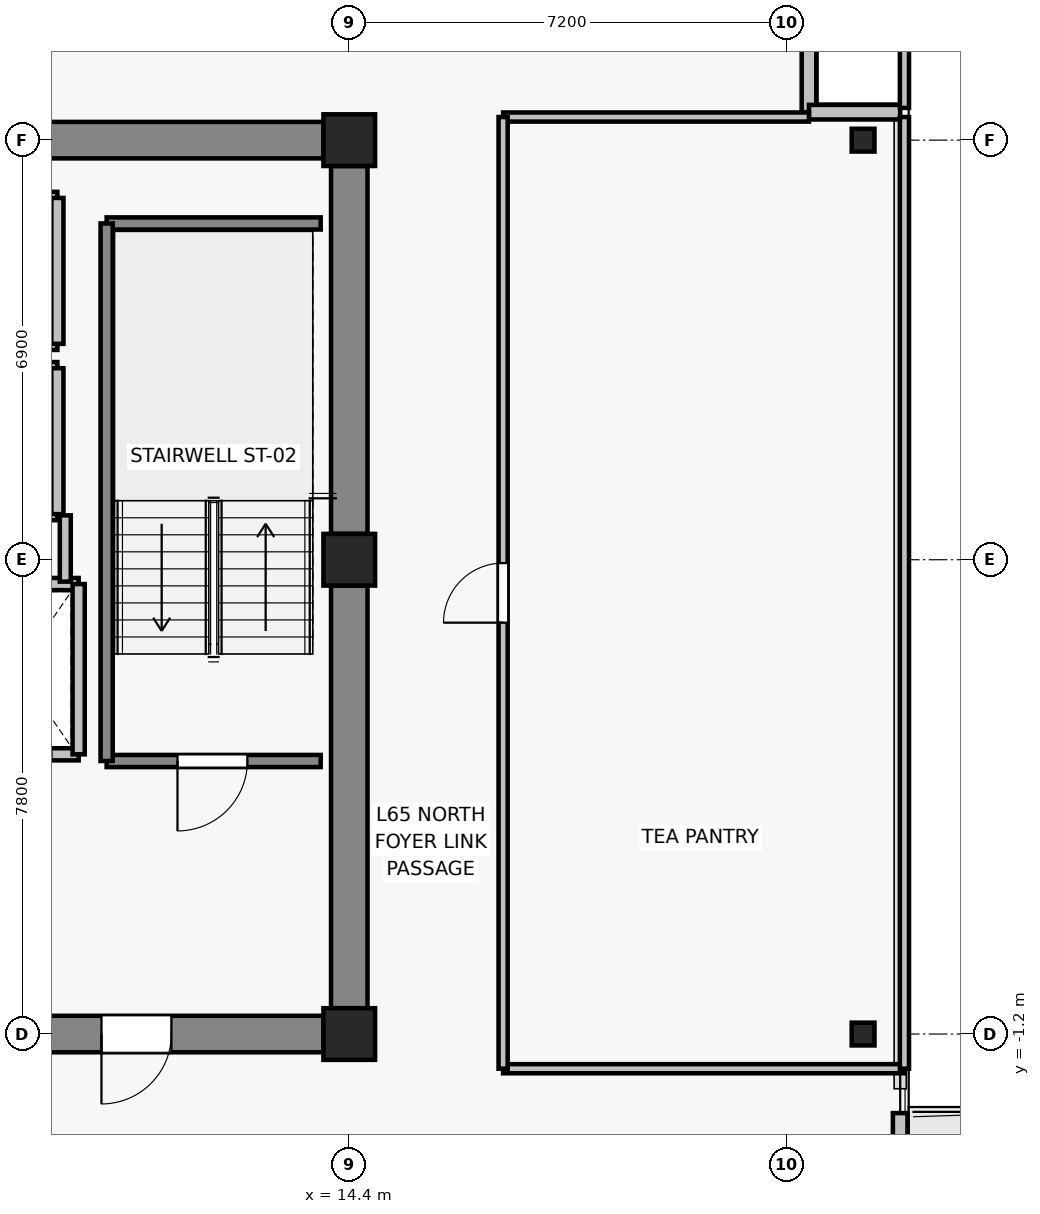
"""IFC4 building model, lengths in metres.
Left out: names, types, materials, properties, quantities, classifications, styles, units other than length and angle.
Written with IfcOpenShell. Run it as: python <this file> out.ifc"""

import sys

from ifc_helpers import new_model, si_unit, direction, frame, frame_2d, origin, origin_2d, place, context, subcontext, project, spatial, rectangle, i_section, extrude, source, transform, mapped, element, fill, save


model = new_model("IFC4")
c1 = context("Model", 3, precision=1e-05, world=origin(), true_north=direction((0.0, 1.0)))
c2 = subcontext(c1, "Body", "Model", "MODEL_VIEW")
j1 = project(units=[si_unit("LENGTHUNIT", "METRE"), si_unit("PLANEANGLEUNIT", "RADIAN")], contexts=[c1])
p1 = place(None, origin())
s1 = spatial("IfcSite", under=j1, at=p1, CompositionType="ELEMENT")
p2 = place(p1, origin())
s2 = spatial("IfcBuilding", under=s1, at=p2, CompositionType="ELEMENT")
p3 = place(p2, frame((0.0, 0.0, 232.0)))
s3 = spatial("IfcBuildingStorey", under=s2, at=p3, CompositionType="ELEMENT", Elevation=232.0)
for number, where, z_axis, x_axis in (
    (1, (14.4, -1.2, 0.0), (0.0, 0.0, 1.0), (1.0, 0.0, 0.0)),
    (2, (14.4, 6.6, 0.0), (0.0, 0.0, 1.0), (1.0, 0.0, 0.0)),
    (3, (14.4, 13.5, 0.0), (0.0, 0.0, 1.0), (1.0, 0.0, 0.0)),
):
    element("IfcColumn", number, at=place(p3, frame(where, z_axis=z_axis, x_axis=x_axis)), inside=s3, PredefinedType="COLUMN", context=c2, shape_type="SweptSolid", body=[
        extrude(rectangle(XDim=0.85, YDim=0.85, at=origin_2d()), origin(), (0.0, 0.0, 1.0), 3.3),
    ])
for number, where, z_axis, x_axis in (
    (4, (22.85, -1.2, 0.0), (0.0, 0.0, 1.0), (1.0, 0.0, 0.0)),
    (5, (22.85, 13.5, 0.0), (0.0, 0.0, 1.0), (1.0, 0.0, 0.0)),
):
    element("IfcColumn", number, at=place(p3, frame(where, z_axis=z_axis, x_axis=x_axis)), inside=s3, PredefinedType="COLUMN", context=c2, shape_type="SweptSolid", body=[
        extrude(i_section(OverallWidth=0.375, OverallDepth=0.375, WebThickness=0.017, FlangeThickness=0.027, FilletRadius=0.015, at=origin_2d()), origin(), (0.0, 0.0, 1.0), 3.3),
    ])
p4 = place(p3, frame((7.625, 13.5, 0.0), z_axis=(0.0, 0.0, 1.0), x_axis=(1.0, 0.0, 0.0)))
e6 = element("IfcWall", 6, at=p4, inside=s3, PredefinedType="SHEAR", context=c2, shape_type="SweptSolid", body=[
    extrude(rectangle(XDim=6.35, YDim=0.6, at=frame_2d((3.175, 0.0))), origin(), (0.0, 0.0, 1.0), 3.075),
])
p5 = place(p3, frame((14.4, -0.775, 0.0), z_axis=(0.0, 0.0, 1.0), x_axis=(0.0, 1.0, 0.0)))
e7 = element("IfcWall", 7, at=p5, inside=s3, PredefinedType="SHEAR", context=c2, shape_type="SweptSolid", body=[
    extrude(rectangle(XDim=6.95, YDim=0.6, at=frame_2d((3.475, 0.0))), origin(), (0.0, 0.0, 1.0), 3.075),
])
p6 = place(p3, frame((14.4, 7.025, 0.0), z_axis=(0.0, 0.0, 1.0), x_axis=(0.0, 1.0, 0.0)))
e8 = element("IfcWall", 8, at=p6, inside=s3, PredefinedType="SHEAR", context=c2, shape_type="SweptSolid", body=[
    extrude(rectangle(XDim=6.05, YDim=0.6, at=frame_2d((3.025, 0.0))), origin(), (0.0, 0.0, 1.0), 3.075),
])
p7 = place(p3, frame((13.975, -1.2, 0.0), z_axis=(0.0, 0.0, 1.0), x_axis=(-1.0, 0.0, 0.0)))
e9 = element("IfcWall", 9, at=p7, inside=s3, PredefinedType="SHEAR", context=c2, shape_type="SweptSolid", body=[
    extrude(rectangle(XDim=6.35, YDim=0.6, at=frame_2d((3.175, 0.0))), origin(), (0.0, 0.0, 1.0), 3.075),
])
p8 = place(p7, frame((2.5, 0.0, 0.0)))
e10 = element("IfcOpeningElement", 10, at=p8, cuts=e9, PredefinedType="OPENING", context=c2, shape_type="SweptSolid", body=[
    extrude(rectangle(XDim=1.15, YDim=2.15, at=frame_2d((0.575, 1.075))), frame((0.0, 0.31, 0.0), z_axis=(0.0, -1.0, 0.0), x_axis=(1.0, 0.0, 0.0)), (0.0, 0.0, 1.0), 0.62),
])
p9 = place(p3, frame((23.46, -2.5, 0.0), z_axis=(0.0, 0.0, 1.0), x_axis=(0.0, -1.0, 0.0)))
e11 = element("IfcWall", 11, at=p9, inside=s3, PredefinedType="SOLIDWALL", context=c2, shape_type="SweptSolid", body=[
    extrude(rectangle(XDim=5.8, YDim=0.24, at=frame_2d((2.9, 0.0))), origin(), (0.0, 0.0, 1.0), 3.075),
])
p10 = place(p9, frame((1.566, 0.0, 0.0)))
e12 = element("IfcOpeningElement", 12, at=p10, cuts=e11, PredefinedType="OPENING", context=c2, shape_type="SweptSolid", body=[
    extrude(rectangle(XDim=1.0, YDim=2.2, at=frame_2d((0.5, 1.1))), frame((0.0, 0.13, 0.0), z_axis=(0.0, -1.0, 0.0), x_axis=(1.0, 0.0, 0.0)), (0.0, 0.0, 1.0), 0.26),
])
p11 = place(p9, frame((2.916, 0.0, 0.85)))
e13 = element("IfcOpeningElement", 13, at=p11, cuts=e11, PredefinedType="OPENING", context=c2, shape_type="SweptSolid", body=[
    extrude(rectangle(XDim=0.9, YDim=1.35, at=frame_2d((0.45, 0.675))), frame((0.0, 0.13, 0.0), z_axis=(0.0, -1.0, 0.0), x_axis=(1.0, 0.0, 0.0)), (0.0, 0.0, 1.0), 0.26),
])
for number, where, z_axis, x_axis in (
    (14, (21.96, 13.96, 0.0), (0.0, 0.0, 1.0), (0.0, 1.0, 0.0)),
    (15, (23.46, 13.96, 0.0), (0.0, 0.0, 1.0), (-1.0, 0.0, 0.0)),
):
    element("IfcWall", number, at=place(p3, frame(where, z_axis=z_axis, x_axis=x_axis)), inside=s3, PredefinedType="SOLIDWALL", context=c2, shape_type="SweptSolid", body=[
        extrude(rectangle(XDim=1.5, YDim=0.24, at=frame_2d((0.75, 0.0))), origin(), (0.0, 0.0, 1.0), 3.075),
    ])
p12 = place(p3, frame((9.95, 3.4, 0.0), z_axis=(0.0, 0.0, 1.0), x_axis=(-1.0, 0.0, 0.0)))
e16 = element("IfcWall", 16, at=p12, inside=s3, PredefinedType="SOLIDWALL", context=c2, shape_type="SweptSolid", body=[
    extrude(rectangle(XDim=2.0, YDim=0.2, at=frame_2d((1.0, 0.0))), origin(), (0.0, 0.0, 1.0), 3.075),
])
p13 = place(p12, frame((0.45, 0.0, 0.0)))
e17 = element("IfcOpeningElement", 17, at=p13, cuts=e16, PredefinedType="OPENING", context=c2, shape_type="SweptSolid", body=[
    extrude(rectangle(XDim=1.1, YDim=2.2, at=frame_2d((0.55, 1.1))), frame((0.0, 0.11, 0.0), z_axis=(0.0, -1.0, 0.0), x_axis=(1.0, 0.0, 0.0)), (0.0, 0.0, 1.0), 0.22),
])
p14 = place(p3, frame((7.95, 6.2, 0.0), z_axis=(0.0, 0.0, 1.0), x_axis=(1.0, 0.0, 0.0)))
e18 = element("IfcWall", 18, at=p14, inside=s3, PredefinedType="SOLIDWALL", context=c2, shape_type="SweptSolid", body=[
    extrude(rectangle(XDim=2.0, YDim=0.2, at=frame_2d((1.0, 0.0))), origin(), (0.0, 0.0, 1.0), 3.075),
])
p15 = place(p3, frame((9.95, 6.2, 0.0), z_axis=(0.0, 0.0, 1.0), x_axis=(0.0, -1.0, 0.0)))
e19 = element("IfcWall", 19, at=p15, inside=s3, PredefinedType="SOLIDWALL", context=c2, shape_type="SweptSolid", body=[
    extrude(rectangle(XDim=2.8, YDim=0.2, at=frame_2d((1.4, 0.0))), origin(), (0.0, 0.0, 1.0), 3.075),
])
for number, where, z_axis, x_axis in (
    (20, (9.6, 7.35, 0.0), (0.0, 0.0, 1.0), (-1.0, 0.0, 0.0)),
    (21, (7.4, 9.75, 0.0), (0.0, 0.0, 1.0), (1.0, 0.0, 0.0)),
):
    element("IfcWall", number, at=place(p3, frame(where, z_axis=z_axis, x_axis=x_axis)), inside=s3, PredefinedType="SOLIDWALL", context=c2, shape_type="SweptSolid", body=[
        extrude(rectangle(XDim=2.2, YDim=0.2, at=frame_2d((1.1, 0.0))), origin(), (0.0, 0.0, 1.0), 2.615),
    ])
p16 = place(p3, frame((9.6, 9.75, 0.0), z_axis=(0.0, 0.0, 1.0), x_axis=(0.0, -1.0, 0.0)))
e22 = element("IfcWall", 22, at=p16, inside=s3, PredefinedType="SOLIDWALL", context=c2, shape_type="SweptSolid", body=[
    extrude(rectangle(XDim=2.4, YDim=0.2, at=frame_2d((1.2, 0.0))), origin(), (0.0, 0.0, 1.0), 3.075),
])
for number, where, z_axis, x_axis in (
    (23, (9.6, 10.15, 0.0), (0.0, 0.0, 1.0), (-1.0, 0.0, 0.0)),
    (24, (7.4, 12.55, 0.0), (0.0, 0.0, 1.0), (1.0, 0.0, 0.0)),
):
    element("IfcWall", number, at=place(p3, frame(where, z_axis=z_axis, x_axis=x_axis)), inside=s3, PredefinedType="SOLIDWALL", context=c2, shape_type="SweptSolid", body=[
        extrude(rectangle(XDim=2.2, YDim=0.2, at=frame_2d((1.1, 0.0))), origin(), (0.0, 0.0, 1.0), 2.615),
    ])
p17 = place(p3, frame((9.6, 12.55, 0.0), z_axis=(0.0, 0.0, 1.0), x_axis=(0.0, -1.0, 0.0)))
e25 = element("IfcWall", 25, at=p17, inside=s3, PredefinedType="SOLIDWALL", context=c2, shape_type="SweptSolid", body=[
    extrude(rectangle(XDim=2.4, YDim=0.2, at=frame_2d((1.2, 0.0))), origin(), (0.0, 0.0, 1.0), 3.075),
])
p18 = place(p3, frame((13.93, 3.29, 0.0), z_axis=(0.0, 0.0, 1.0), x_axis=(-1.0, 0.0, 0.0)))
e26 = element("IfcWall", 26, at=p18, inside=s3, PredefinedType="SOLIDWALL", context=c2, shape_type="SweptSolid", body=[
    extrude(rectangle(XDim=3.52, YDim=0.2, at=frame_2d((1.76, 0.0))), origin(), (0.0, 0.0, 1.0), 3.075),
])
p19 = place(p18, frame((1.205, 0.0, 0.0)))
e27 = element("IfcOpeningElement", 27, at=p19, cuts=e26, PredefinedType="OPENING", context=c2, shape_type="SweptSolid", body=[
    extrude(rectangle(XDim=1.15, YDim=2.15, at=frame_2d((0.575, 1.075))), frame((0.0, 0.11, 0.0), z_axis=(0.0, -1.0, 0.0), x_axis=(1.0, 0.0, 0.0)), (0.0, 0.0, 1.0), 0.22),
])
p20 = place(p3, frame((10.41, 12.13, 0.0), z_axis=(0.0, 0.0, 1.0), x_axis=(1.0, 0.0, 0.0)))
e28 = element("IfcWall", 28, at=p20, inside=s3, PredefinedType="SOLIDWALL", context=c2, shape_type="SweptSolid", body=[
    extrude(rectangle(XDim=3.52, YDim=0.2, at=frame_2d((1.76, 0.0))), origin(), (0.0, 0.0, 1.0), 3.075),
])
p21 = place(p3, frame((10.41, 3.29, 0.0), z_axis=(0.0, 0.0, 1.0), x_axis=(0.0, 1.0, 0.0)))
e29 = element("IfcWall", 29, at=p21, inside=s3, PredefinedType="SOLIDWALL", context=c2, shape_type="SweptSolid", body=[
    extrude(rectangle(XDim=8.84, YDim=0.2, at=frame_2d((4.42, 0.0))), origin(), (0.0, 0.0, 1.0), 3.075),
])
p22 = place(p3, frame((9.73, 7.33, 0.0), z_axis=(0.0, 0.0, 1.0), x_axis=(0.0, -1.0, 0.0)))
e30 = element("IfcWall", 30, at=p22, inside=s3, PredefinedType="PARTITIONING", context=c2, shape_type="SweptSolid", body=[
    extrude(rectangle(XDim=1.09, YDim=0.18, at=frame_2d((0.545, 0.0))), origin(), (0.0, 0.0, 1.0), 3.075),
])
p23 = place(p3, frame((23.53, -1.77, 0.0), z_axis=(0.0, 0.0, 1.0), x_axis=(-1.0, 0.0, 0.0)))
e31 = element("IfcWall", 31, at=p23, inside=s3, PredefinedType="PARTITIONING", context=c2, shape_type="SweptSolid", body=[
    extrude(rectangle(XDim=6.6, YDim=0.15, at=frame_2d((3.3, 0.0))), origin(), (0.0, 0.0, 1.0), 2.765),
])
p24 = place(p3, frame((16.93, 13.88, 0.0), z_axis=(0.0, 0.0, 1.0), x_axis=(1.0, 0.0, 0.0)))
e32 = element("IfcWall", 32, at=p24, inside=s3, PredefinedType="PARTITIONING", context=c2, shape_type="SweptSolid", body=[
    extrude(rectangle(XDim=5.03, YDim=0.15, at=frame_2d((2.515, 0.0))), origin(), (0.0, 0.0, 1.0), 3.075),
])
p25 = place(p3, frame((16.93, -1.77, 0.0), z_axis=(0.0, 0.0, 1.0), x_axis=(0.0, 1.0, 0.0)))
e33 = element("IfcWall", 33, at=p25, inside=s3, PredefinedType="PARTITIONING", context=c2, shape_type="SweptSolid", body=[
    extrude(rectangle(XDim=15.65, YDim=0.15, at=frame_2d((7.825, 0.0))), origin(), (0.0, 0.0, 1.0), 2.615),
])
p26 = place(p25, frame((7.335, 0.0, 0.0)))
e34 = element("IfcOpeningElement", 34, at=p26, cuts=e33, PredefinedType="OPENING", context=c2, shape_type="SweptSolid", body=[
    extrude(rectangle(XDim=0.98, YDim=2.15, at=frame_2d((0.49, 1.075))), frame((0.0, 0.085, 0.0), z_axis=(0.0, -1.0, 0.0), x_axis=(1.0, 0.0, 0.0)), (0.0, 0.0, 1.0), 0.17),
])
p27 = place(p3, frame((23.53, 13.88, 0.0), z_axis=(0.0, 0.0, 1.0), x_axis=(0.0, -1.0, 0.0)))
e35 = element("IfcWall", 35, at=p27, inside=s3, PredefinedType="PARTITIONING", context=c2, shape_type="SweptSolid", body=[
    extrude(rectangle(XDim=15.65, YDim=0.15, at=frame_2d((7.825, 0.0))), origin(), (0.0, 0.0, 1.0), 3.075),
])
p28 = place(p3, frame((23.53, 17.03, 0.0), z_axis=(0.0, 0.0, 1.0), x_axis=(0.0, -1.0, 0.0)))
e36 = element("IfcWall", 36, at=p28, inside=s3, PredefinedType="PARTITIONING", context=c2, shape_type="SweptSolid", body=[
    extrude(rectangle(XDim=3.0, YDim=0.15, at=frame_2d((1.5, 0.0))), origin(), (0.0, 0.0, 1.0), 3.075),
])
m1 = source(origin(), c2, "Body", "SweptSolid", [
    extrude(rectangle(XDim=1.15, YDim=2.15, at=frame_2d((0.575, 1.075))), frame((0.0, 0.025, 0.0), z_axis=(0.0, -1.0, 0.0), x_axis=(1.0, 0.0, 0.0)), (0.0, 0.0, 1.0), 0.05),
])
p29 = place(p19, origin())
e37 = element("IfcDoor", 37, at=p29, inside=s3, OperationType="SINGLE_SWING_RIGHT", PredefinedType="DOOR", context=c2, shape_type="MappedRepresentation", body=[
    mapped(m1, transform((0.0, 0.0, 0.0), x_axis=(1.0, 0.0, 0.0), y_axis=(0.0, 1.0, 0.0), z_axis=(0.0, 0.0, 1.0), scale=1.0)),
])
fill(e27, e37)
p30 = place(p8, origin())
e38 = element("IfcDoor", 38, at=p30, inside=s3, OperationType="SINGLE_SWING_RIGHT", PredefinedType="DOOR", context=c2, shape_type="MappedRepresentation", body=[
    mapped(m1, transform((0.0, 0.0, 0.0), x_axis=(1.0, 0.0, 0.0), y_axis=(0.0, 1.0, 0.0), z_axis=(0.0, 0.0, 1.0), scale=1.0)),
])
fill(e10, e38)
m2 = source(origin(), c2, "Body", "SweptSolid", [
    extrude(rectangle(XDim=0.98, YDim=2.15, at=frame_2d((0.49, 1.075))), frame((0.0, 0.025, 0.0), z_axis=(0.0, -1.0, 0.0), x_axis=(1.0, 0.0, 0.0)), (0.0, 0.0, 1.0), 0.05),
])
p31 = place(p26, origin())
e39 = element("IfcDoor", 39, at=p31, inside=s3, OperationType="SINGLE_SWING_LEFT", PredefinedType="DOOR", context=c2, shape_type="MappedRepresentation", body=[
    mapped(m2, transform((0.0, 0.0, 0.0), x_axis=(1.0, 0.0, 0.0), y_axis=(0.0, 1.0, 0.0), z_axis=(0.0, 0.0, 1.0), scale=1.0)),
])
fill(e34, e39)
save(model, sys.argv[1])
